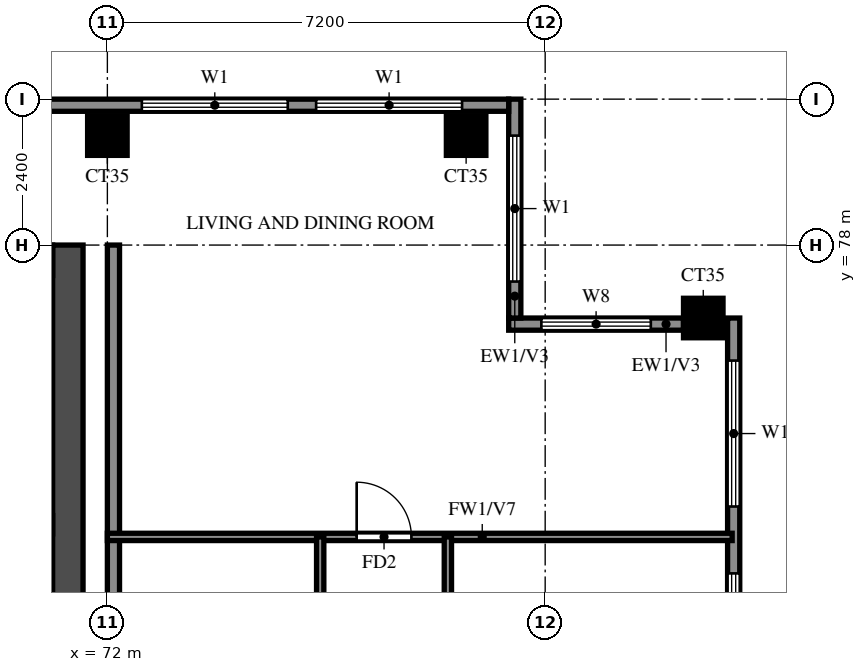
"""IFC4 building model, lengths in metres.
Left out: names, types, materials, properties, quantities, classifications, styles, units other than length and angle.
Written with IfcOpenShell. Run it as: python <this file> out.ifc"""

import sys

from ifc_helpers import new_model, si_unit, direction, frame, frame_2d, origin, origin_2d, place, context, subcontext, project, spatial, rectangle, extrude, source, transform, mapped, element, fill, save


model = new_model("IFC4")
c1 = context("Model", 3, precision=1e-05, world=origin(), true_north=direction((0.0, 1.0)))
c2 = subcontext(c1, "Body", "Model", "MODEL_VIEW")
j1 = project(units=[si_unit("LENGTHUNIT", "METRE"), si_unit("PLANEANGLEUNIT", "RADIAN")], contexts=[c1])
p1 = place(None, origin())
s1 = spatial("IfcSite", under=j1, at=p1, CompositionType="ELEMENT")
p2 = place(p1, origin())
s2 = spatial("IfcBuilding", under=s1, at=p2, CompositionType="ELEMENT")
p3 = place(p2, frame((0.0, 0.0, 239.5)))
s3 = spatial("IfcBuildingStorey", under=s2, at=p3, CompositionType="ELEMENT", Elevation=239.5)
m1 = source(origin(), c2, "Body", "SweptSolid", [
    extrude(rectangle(XDim=0.65, YDim=0.65, at=origin_2d()), origin(), (0.0, 0.0, 1.0), 3.22),
])
for number, where, z_axis, x_axis in (
    (1, (81.8, 76.8, 0.0), (0.0, 0.0, 1.0), (1.0, 0.0, 0.0)),
    (2, (72.0, 79.8, 0.0), (0.0, 0.0, 1.0), (1.0, 0.0, 0.0)),
    (3, (77.9, 79.8, 0.0), (0.0, 0.0, 1.0), (1.0, 0.0, 0.0)),
):
    element("IfcColumn", number, at=place(p3, frame(where, z_axis=z_axis, x_axis=x_axis)), inside=s3, PredefinedType="COLUMN", context=c2, shape_type="MappedRepresentation", body=[
        mapped(m1, transform((0.0, 0.0, 0.0))),
    ])
p4 = place(p3, frame((71.35, 66.15, 0.0), z_axis=(0.0, 0.0, 1.0), x_axis=(0.0, 1.0, 0.0)))
e4 = element("IfcWall", 4, at=p4, inside=s3, PredefinedType="SHEAR", context=c2, shape_type="SweptSolid", body=[
    extrude(rectangle(XDim=11.85, YDim=0.5, at=frame_2d((5.925, 0.0))), origin(), (0.0, 0.0, 1.0), 3.22),
])
p5 = place(p3, frame((29.7, 77.75, 0.0), z_axis=(0.0, 0.0, 1.0), x_axis=(1.0, 0.0, 0.0)))
e5 = element("IfcWall", 5, at=p5, inside=s3, PredefinedType="SHEAR", context=c2, shape_type="SweptSolid", body=[
    extrude(rectangle(XDim=41.4, YDim=0.5, at=frame_2d((20.7, 0.0))), origin(), (0.0, 0.0, 1.0), 3.22),
])
p6 = place(p3, frame((82.3, 62.4, 0.0), z_axis=(0.0, 0.0, 1.0), x_axis=(0.0, 1.0, 0.0)))
e6 = element("IfcWall", 6, at=p6, inside=s3, PredefinedType="SOLIDWALL", context=c2, shape_type="SweptSolid", body=[
    extrude(rectangle(XDim=14.4, YDim=0.2, at=frame_2d((7.2, 0.0))), origin(), (0.0, 0.0, 1.0), 3.22),
])
p7 = place(p6, frame((0.7, 0.0, 0.6)))
e7 = element("IfcOpeningElement", 7, at=p7, cuts=e6, PredefinedType="OPENING", context=c2, shape_type="SweptSolid", body=[
    extrude(rectangle(XDim=2.4, YDim=2.4, at=frame_2d((1.2, 1.2))), frame((0.0, 0.11, 0.0), z_axis=(0.0, -1.0, 0.0), x_axis=(1.0, 0.0, 0.0)), (0.0, 0.0, 1.0), 0.22),
])
p8 = place(p6, frame((4.95, 0.0, 1.5)))
e8 = element("IfcOpeningElement", 8, at=p8, cuts=e6, PredefinedType="OPENING", context=c2, shape_type="SweptSolid", body=[
    extrude(rectangle(XDim=0.9, YDim=0.9, at=frame_2d((0.45, 0.45))), frame((0.0, 0.11, 0.0), z_axis=(0.0, -1.0, 0.0), x_axis=(1.0, 0.0, 0.0)), (0.0, 0.0, 1.0), 0.22),
])
p9 = place(p6, frame((7.8, 0.0, 0.6)))
e9 = element("IfcOpeningElement", 9, at=p9, cuts=e6, PredefinedType="OPENING", context=c2, shape_type="SweptSolid", body=[
    extrude(rectangle(XDim=2.4, YDim=2.4, at=frame_2d((1.2, 1.2))), frame((0.0, 0.11, 0.0), z_axis=(0.0, -1.0, 0.0), x_axis=(1.0, 0.0, 0.0)), (0.0, 0.0, 1.0), 0.22),
])
p10 = place(p6, frame((11.3, 0.0, 0.6)))
e10 = element("IfcOpeningElement", 10, at=p10, cuts=e6, PredefinedType="OPENING", context=c2, shape_type="SweptSolid", body=[
    extrude(rectangle(XDim=2.4, YDim=2.4, at=frame_2d((1.2, 1.2))), frame((0.0, 0.11, 0.0), z_axis=(0.0, -1.0, 0.0), x_axis=(1.0, 0.0, 0.0)), (0.0, 0.0, 1.0), 0.22),
])
p11 = place(p3, frame((81.475, 76.7, 0.0), z_axis=(0.0, 0.0, 1.0), x_axis=(-1.0, 0.0, 0.0)))
e11 = element("IfcWall", 11, at=p11, inside=s3, PredefinedType="SOLIDWALL", context=c2, shape_type="SweptSolid", body=[
    extrude(rectangle(XDim=2.875, YDim=0.2, at=frame_2d((1.438, 0.0))), origin(), (0.0, 0.0, 1.0), 3.22),
])
p12 = place(p11, frame((0.538, 0.0, 0.6)))
e12 = element("IfcOpeningElement", 12, at=p12, cuts=e11, PredefinedType="OPENING", context=c2, shape_type="SweptSolid", body=[
    extrude(rectangle(XDim=1.8, YDim=2.4, at=frame_2d((0.9, 1.2))), frame((0.0, 0.11, 0.0), z_axis=(0.0, -1.0, 0.0), x_axis=(1.0, 0.0, 0.0)), (0.0, 0.0, 1.0), 0.22),
])
p13 = place(p3, frame((78.7, 76.8, 0.0), z_axis=(0.0, 0.0, 1.0), x_axis=(0.0, 1.0, 0.0)))
e13 = element("IfcWall", 13, at=p13, inside=s3, PredefinedType="SOLIDWALL", context=c2, shape_type="SweptSolid", body=[
    extrude(rectangle(XDim=3.6, YDim=0.2, at=frame_2d((1.8, 0.0))), origin(), (0.0, 0.0, 1.0), 3.22),
])
p14 = place(p13, frame((0.6, 0.0, 0.6)))
e14 = element("IfcOpeningElement", 14, at=p14, cuts=e13, PredefinedType="OPENING", context=c2, shape_type="SweptSolid", body=[
    extrude(rectangle(XDim=2.4, YDim=2.4, at=frame_2d((1.2, 1.2))), frame((0.0, 0.11, 0.0), z_axis=(0.0, -1.0, 0.0), x_axis=(1.0, 0.0, 0.0)), (0.0, 0.0, 1.0), 0.22),
])
p15 = place(p3, frame((78.6, 80.3, 0.0), z_axis=(0.0, 0.0, 1.0), x_axis=(-1.0, 0.0, 0.0)))
e15 = element("IfcWall", 15, at=p15, inside=s3, PredefinedType="SOLIDWALL", context=c2, shape_type="SweptSolid", body=[
    extrude(rectangle(XDim=56.6, YDim=0.2, at=frame_2d((28.3, 0.0))), origin(), (0.0, 0.0, 1.0), 3.22),
])
p16 = place(p15, frame((50.7, 0.0, 0.0)))
e16 = element("IfcOpeningElement", 16, at=p16, cuts=e15, PredefinedType="OPENING", context=c2, shape_type="SweptSolid", body=[
    extrude(rectangle(XDim=1.8, YDim=2.4, at=frame_2d((0.9, 1.2))), frame((0.0, 0.11, 0.0), z_axis=(0.0, -1.0, 0.0), x_axis=(1.0, 0.0, 0.0)), (0.0, 0.0, 1.0), 0.22),
])
p17 = place(p15, frame((52.95, 0.0, 0.6)))
e17 = element("IfcOpeningElement", 17, at=p17, cuts=e15, PredefinedType="OPENING", context=c2, shape_type="SweptSolid", body=[
    extrude(rectangle(XDim=0.9, YDim=2.4, at=frame_2d((0.45, 1.2))), frame((0.0, 0.11, 0.0), z_axis=(0.0, -1.0, 0.0), x_axis=(1.0, 0.0, 0.0)), (0.0, 0.0, 1.0), 0.22),
])
p18 = place(p15, frame((54.9, 0.0, 0.6)))
e18 = element("IfcOpeningElement", 18, at=p18, cuts=e15, PredefinedType="OPENING", context=c2, shape_type="SweptSolid", body=[
    extrude(rectangle(XDim=1.2, YDim=2.4, at=frame_2d((0.6, 1.2))), frame((0.0, 0.11, 0.0), z_axis=(0.0, -1.0, 0.0), x_axis=(1.0, 0.0, 0.0)), (0.0, 0.0, 1.0), 0.22),
])
p19 = place(p15, frame((0.767, 0.0, 0.6)))
e19 = element("IfcOpeningElement", 19, at=p19, cuts=e15, PredefinedType="OPENING", context=c2, shape_type="SweptSolid", body=[
    extrude(rectangle(XDim=2.4, YDim=2.4, at=frame_2d((1.2, 1.2))), frame((0.0, 0.11, 0.0), z_axis=(0.0, -1.0, 0.0), x_axis=(1.0, 0.0, 0.0)), (0.0, 0.0, 1.0), 0.22),
])
p20 = place(p15, frame((3.633, 0.0, 0.6)))
e20 = element("IfcOpeningElement", 20, at=p20, cuts=e15, PredefinedType="OPENING", context=c2, shape_type="SweptSolid", body=[
    extrude(rectangle(XDim=2.4, YDim=2.4, at=frame_2d((1.2, 1.2))), frame((0.0, 0.11, 0.0), z_axis=(0.0, -1.0, 0.0), x_axis=(1.0, 0.0, 0.0)), (0.0, 0.0, 1.0), 0.22),
])
p21 = place(p3, frame((72.1, 62.4, 0.0), z_axis=(0.0, 0.0, 1.0), x_axis=(0.0, 1.0, 0.0)))
e21 = element("IfcWall", 21, at=p21, inside=s3, PredefinedType="SOLIDWALL", context=c2, shape_type="SweptSolid", body=[
    extrude(rectangle(XDim=15.6, YDim=0.2, at=frame_2d((7.8, 0.0))), origin(), (0.0, 0.0, 1.0), 3.22),
])
p22 = place(p3, frame((72.0, 73.2, 0.0), z_axis=(0.0, 0.0, 1.0), x_axis=(1.0, 0.0, 0.0)))
e22 = element("IfcWall", 22, at=p22, inside=s3, PredefinedType="PARTITIONING", context=c2, shape_type="SweptSolid", body=[
    extrude(rectangle(XDim=10.275, YDim=0.12, at=frame_2d((5.137, 0.0))), origin(), (0.0, 0.0, 1.0), 2.32),
])
p23 = place(p22, frame((4.1, 0.0, 0.0)))
e23 = element("IfcOpeningElement", 23, at=p23, cuts=e22, PredefinedType="OPENING", context=c2, shape_type="SweptSolid", body=[
    extrude(rectangle(XDim=0.9, YDim=2.1, at=frame_2d((0.45, 1.05))), frame((0.0, 0.07, 0.0), z_axis=(0.0, -1.0, 0.0), x_axis=(1.0, 0.0, 0.0)), (0.0, 0.0, 1.0), 0.14),
])
p24 = place(p3, frame((75.5, 64.8, 0.0), z_axis=(0.0, 0.0, 1.0), x_axis=(0.0, 1.0, 0.0)))
e24 = element("IfcWall", 24, at=p24, inside=s3, PredefinedType="PARTITIONING", context=c2, shape_type="SweptSolid", body=[
    extrude(rectangle(XDim=8.4, YDim=0.12, at=frame_2d((4.2, 0.0))), origin(), (0.0, 0.0, 1.0), 3.22),
])
p25 = place(p24, frame((1.925, 0.0, 0.0)))
e25 = element("IfcOpeningElement", 25, at=p25, cuts=e24, PredefinedType="OPENING", context=c2, shape_type="SweptSolid", body=[
    extrude(rectangle(XDim=0.9, YDim=2.1, at=frame_2d((0.45, 1.05))), frame((0.0, 0.07, 0.0), z_axis=(0.0, -1.0, 0.0), x_axis=(1.0, 0.0, 0.0)), (0.0, 0.0, 1.0), 0.14),
])
p26 = place(p24, frame((6.125, 0.0, 0.0)))
e26 = element("IfcOpeningElement", 26, at=p26, cuts=e24, PredefinedType="OPENING", context=c2, shape_type="SweptSolid", body=[
    extrude(rectangle(XDim=0.9, YDim=2.1, at=frame_2d((0.45, 1.05))), frame((0.0, 0.07, 0.0), z_axis=(0.0, -1.0, 0.0), x_axis=(1.0, 0.0, 0.0)), (0.0, 0.0, 1.0), 0.14),
])
p27 = place(p3, frame((77.6, 69.6, 0.0), z_axis=(0.0, 0.0, 1.0), x_axis=(0.0, 1.0, 0.0)))
e27 = element("IfcWall", 27, at=p27, inside=s3, PredefinedType="PARTITIONING", context=c2, shape_type="SweptSolid", body=[
    extrude(rectangle(XDim=3.6, YDim=0.12, at=frame_2d((1.8, 0.0))), origin(), (0.0, 0.0, 1.0), 3.22),
])
p28 = place(p27, frame((1.35, 0.0, 0.0)))
e28 = element("IfcOpeningElement", 28, at=p28, cuts=e27, PredefinedType="OPENING", context=c2, shape_type="SweptSolid", body=[
    extrude(rectangle(XDim=0.9, YDim=2.1, at=frame_2d((0.45, 1.05))), frame((0.0, 0.07, 0.0), z_axis=(0.0, -1.0, 0.0), x_axis=(1.0, 0.0, 0.0)), (0.0, 0.0, 1.0), 0.14),
])
p29 = place(p9, origin())
e29 = element("IfcWindow", 29, at=p29, inside=s3, PartitioningType="DOUBLE_PANEL_VERTICAL", PredefinedType="WINDOW", context=c2, shape_type="SweptSolid", body=[
    extrude(rectangle(XDim=2.4, YDim=2.4, at=frame_2d((1.2, 1.2))), frame((0.0, 0.03, 0.0), z_axis=(0.0, -1.0, 0.0), x_axis=(1.0, 0.0, 0.0)), (0.0, 0.0, 1.0), 0.06),
])
fill(e9, e29)
p30 = place(p10, origin())
e30 = element("IfcWindow", 30, at=p30, inside=s3, PartitioningType="DOUBLE_PANEL_VERTICAL", PredefinedType="WINDOW", context=c2, shape_type="SweptSolid", body=[
    extrude(rectangle(XDim=2.4, YDim=2.4, at=frame_2d((1.2, 1.2))), frame((0.0, 0.03, 0.0), z_axis=(0.0, -1.0, 0.0), x_axis=(1.0, 0.0, 0.0)), (0.0, 0.0, 1.0), 0.06),
])
fill(e10, e30)
p31 = place(p12, origin())
e31 = element("IfcWindow", 31, at=p31, inside=s3, PartitioningType="DOUBLE_PANEL_VERTICAL", PredefinedType="WINDOW", context=c2, shape_type="SweptSolid", body=[
    extrude(rectangle(XDim=1.8, YDim=2.4, at=frame_2d((0.9, 1.2))), frame((0.0, 0.03, 0.0), z_axis=(0.0, -1.0, 0.0), x_axis=(1.0, 0.0, 0.0)), (0.0, 0.0, 1.0), 0.06),
])
fill(e12, e31)
p32 = place(p14, origin())
e32 = element("IfcWindow", 32, at=p32, inside=s3, PartitioningType="DOUBLE_PANEL_VERTICAL", PredefinedType="WINDOW", context=c2, shape_type="SweptSolid", body=[
    extrude(rectangle(XDim=2.4, YDim=2.4, at=frame_2d((1.2, 1.2))), frame((0.0, 0.03, 0.0), z_axis=(0.0, -1.0, 0.0), x_axis=(1.0, 0.0, 0.0)), (0.0, 0.0, 1.0), 0.06),
])
fill(e14, e32)
p33 = place(p19, origin())
e33 = element("IfcWindow", 33, at=p33, inside=s3, PartitioningType="DOUBLE_PANEL_VERTICAL", PredefinedType="WINDOW", context=c2, shape_type="SweptSolid", body=[
    extrude(rectangle(XDim=2.4, YDim=2.4, at=frame_2d((1.2, 1.2))), frame((0.0, 0.03, 0.0), z_axis=(0.0, -1.0, 0.0), x_axis=(1.0, 0.0, 0.0)), (0.0, 0.0, 1.0), 0.06),
])
fill(e19, e33)
p34 = place(p20, origin())
e34 = element("IfcWindow", 34, at=p34, inside=s3, PartitioningType="DOUBLE_PANEL_VERTICAL", PredefinedType="WINDOW", context=c2, shape_type="SweptSolid", body=[
    extrude(rectangle(XDim=2.4, YDim=2.4, at=frame_2d((1.2, 1.2))), frame((0.0, 0.03, 0.0), z_axis=(0.0, -1.0, 0.0), x_axis=(1.0, 0.0, 0.0)), (0.0, 0.0, 1.0), 0.06),
])
fill(e20, e34)
p35 = place(p23, origin())
e35 = element("IfcDoor", 35, at=p35, inside=s3, OperationType="SINGLE_SWING_LEFT", PredefinedType="DOOR", context=c2, shape_type="SweptSolid", body=[
    extrude(rectangle(XDim=0.9, YDim=2.1, at=frame_2d((0.45, 1.05))), frame((0.0, 0.025, 0.0), z_axis=(0.0, -1.0, 0.0), x_axis=(1.0, 0.0, 0.0)), (0.0, 0.0, 1.0), 0.05),
])
fill(e23, e35)
save(model, sys.argv[1])
